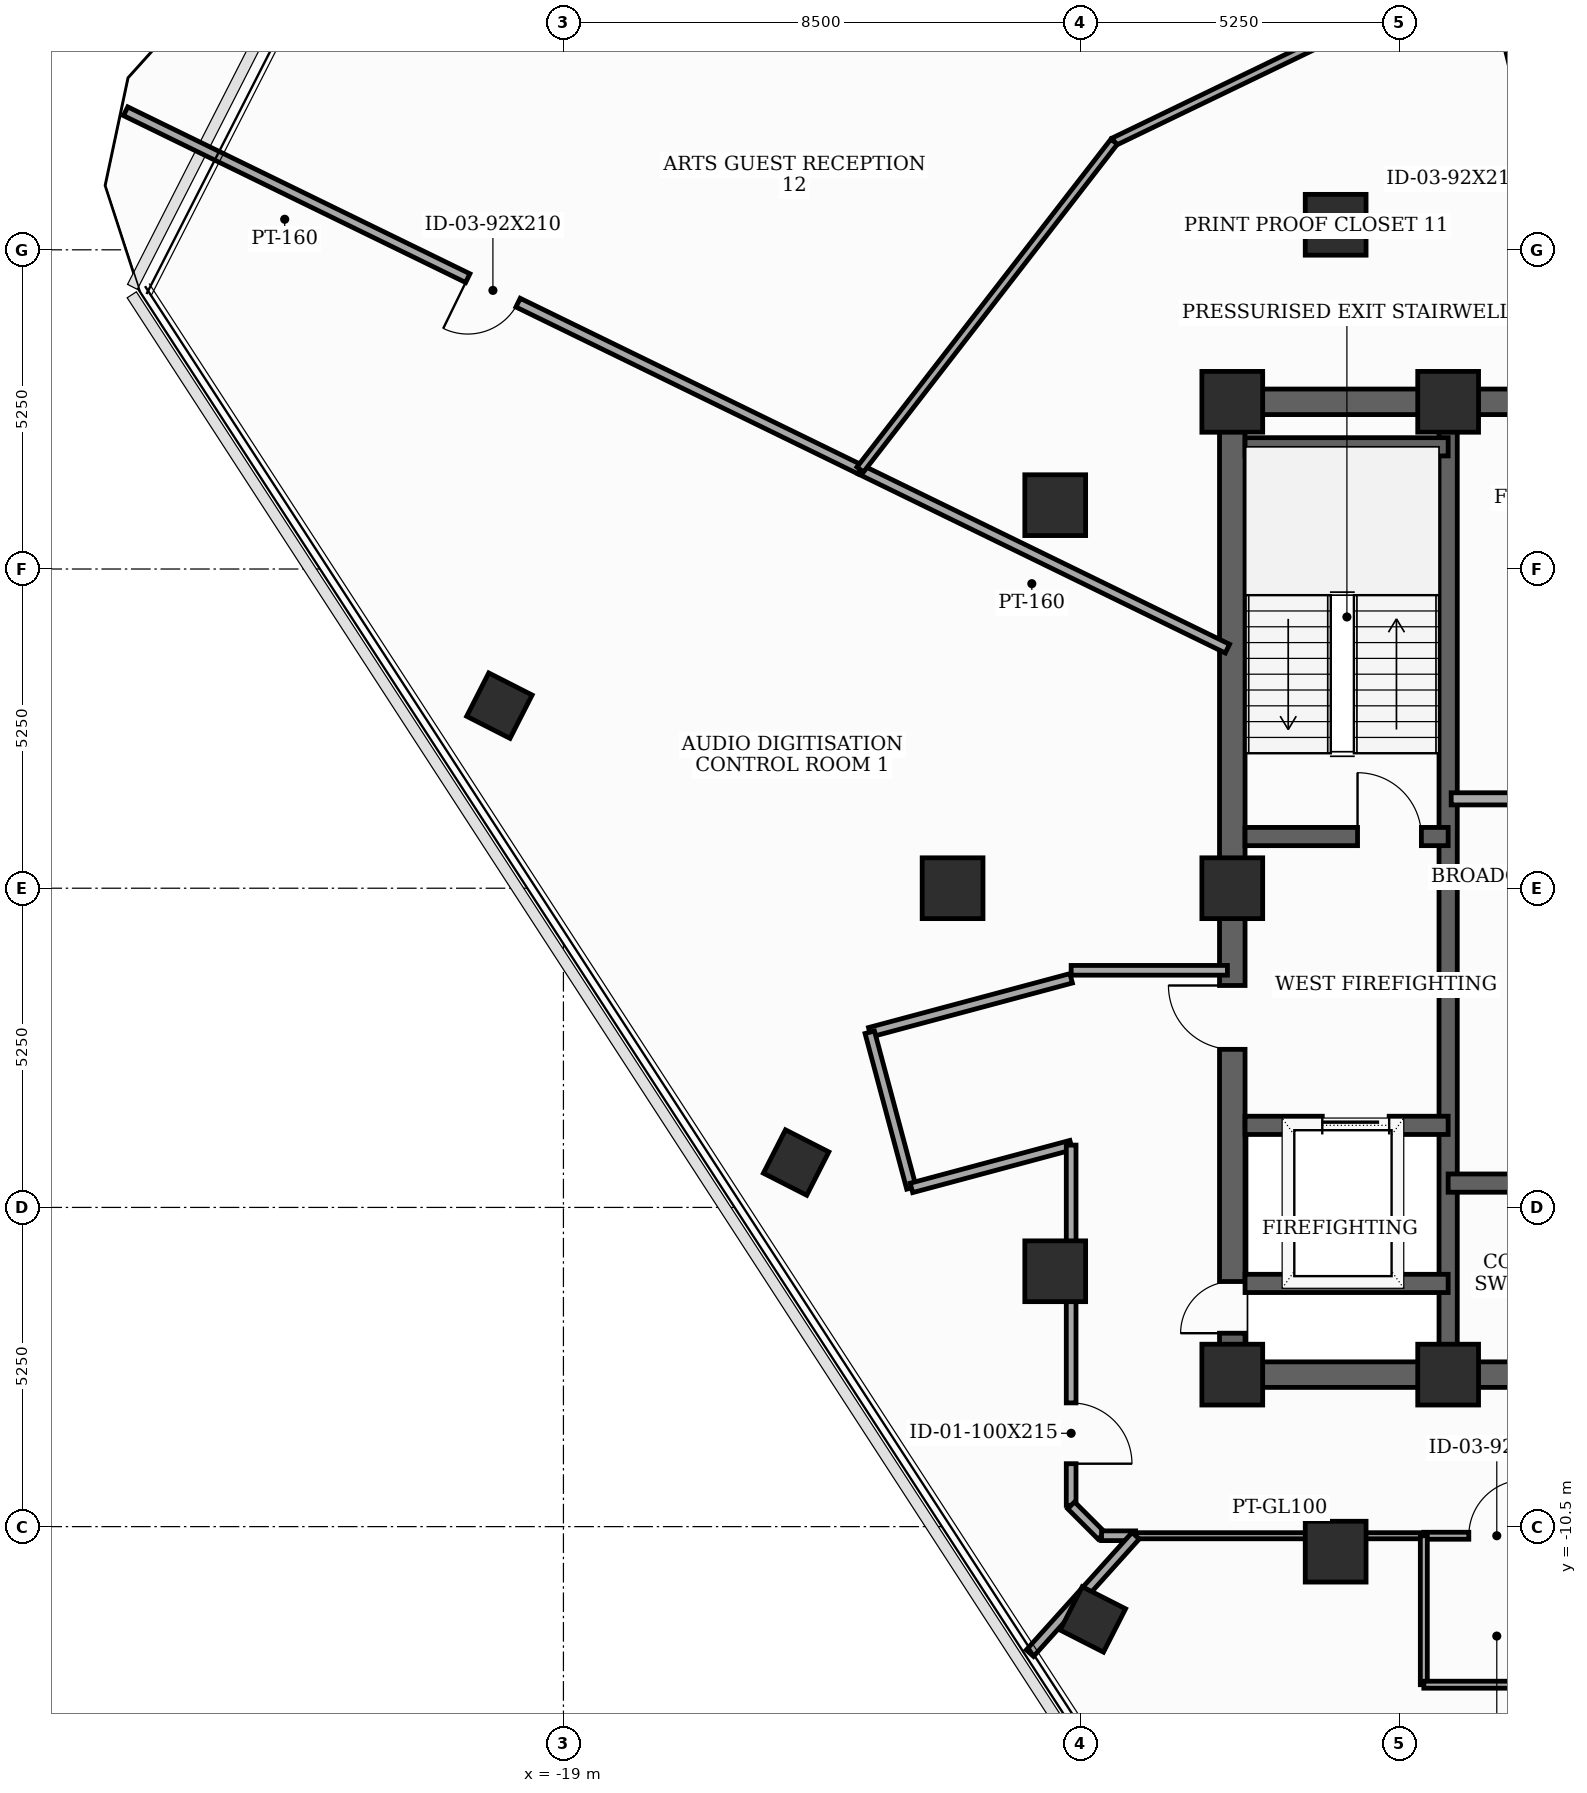
"""IFC4 building model, lengths in metres.
Left out: names, types, materials, properties, quantities, classifications, styles, units other than length and angle.
Written with IfcOpenShell. Run it as: python <this file> out.ifc"""

import sys

from ifc_helpers import new_model, si_unit, direction, frame, frame_2d, origin, origin_2d, place, context, subcontext, project, spatial, rectangle, extrude, element, fill, save


model = new_model("IFC4")
c1 = context("Model", 3, precision=1e-05, world=origin(), true_north=direction((0.0, 1.0)))
c2 = subcontext(c1, "Body", "Model", "MODEL_VIEW")
j1 = project(units=[si_unit("LENGTHUNIT", "METRE"), si_unit("PLANEANGLEUNIT", "RADIAN")], contexts=[c1])
p1 = place(None, origin())
s1 = spatial("IfcSite", under=j1, at=p1, CompositionType="ELEMENT")
p2 = place(p1, origin())
s2 = spatial("IfcBuilding", under=s1, at=p2, CompositionType="ELEMENT")
p3 = place(p2, frame((0.0, 0.0, 248.5)))
s3 = spatial("IfcBuildingStorey", under=s2, at=p3, CompositionType="ELEMENT", Elevation=248.5)
for number, where, z_axis, x_axis in (
    (1, (-8.0, -8.0, 0.0), (0.0, 0.0, 1.0), (1.0, 0.0, 0.0)),
    (2, (-4.45, -8.0, 0.0), (0.0, 0.0, 1.0), (1.0, 0.0, 0.0)),
    (3, (-4.45, 8.0, 0.0), (0.0, 0.0, 1.0), (1.0, 0.0, 0.0)),
    (4, (-8.0, 8.0, 0.0), (0.0, 0.0, 1.0), (1.0, 0.0, 0.0)),
    (5, (-8.0, 0.0, 0.0), (0.0, 0.0, 1.0), (1.0, 0.0, 0.0)),
    (6, (-6.3, 10.912, 0.0), (0.0, 0.0, 1.0), (1.0, 0.0, 0.0)),
    (7, (-10.912, 6.3, 0.0), (0.0, 0.0, 1.0), (1.0, 0.0, 0.0)),
    (8, (-12.6, 0.0, 0.0), (0.0, 0.0, 1.0), (1.0, 0.0, 0.0)),
    (9, (-10.912, -6.3, 0.0), (0.0, 0.0, 1.0), (1.0, 0.0, 0.0)),
    (10, (-6.3, -10.912, 0.0), (0.0, 0.0, 1.0), (1.0, 0.0, 0.0)),
):
    element("IfcColumn", number, at=place(p3, frame(where, z_axis=z_axis, x_axis=x_axis)), inside=s3, PredefinedType="COLUMN", context=c2, shape_type="SweptSolid", body=[
        extrude(rectangle(XDim=1.0, YDim=1.0, at=origin_2d()), origin(), (0.0, 0.0, 1.0), 3.7),
    ])
for number, where, z_axis, x_axis in (
    (11, (-20.053, 3.003, 0.0), (0.0, 0.0, 1.0), (0.454, 0.891, 0.0)),
    (12, (-15.173, -4.512, 0.0), (0.0, 0.0, 1.0), (0.454, 0.891, 0.0)),
    (13, (-10.293, -12.026, 0.0), (0.0, 0.0, 1.0), (0.454, 0.891, 0.0)),
):
    element("IfcColumn", number, at=place(p3, frame(where, z_axis=z_axis, x_axis=x_axis)), inside=s3, PredefinedType="COLUMN", context=c2, shape_type="SweptSolid", body=[
        extrude(rectangle(XDim=0.8, YDim=0.8, at=origin_2d()), origin(), (0.0, 0.0, 1.0), 3.7),
    ])
p4 = place(p3, frame((-8.0, -8.0, 0.0), z_axis=(0.0, 0.0, 1.0), x_axis=(0.0, 1.0, 0.0)))
e14 = element("IfcWall", 14, at=p4, inside=s3, PredefinedType="SHEAR", context=c2, shape_type="SweptSolid", body=[
    extrude(rectangle(XDim=16.0, YDim=0.42, at=frame_2d((8.0, 0.0))), origin(), (0.0, 0.0, 1.0), 3.5),
])
p5 = place(p4, frame((0.681, 0.0, 0.0)))
e15 = element("IfcOpeningElement", 15, at=p5, cuts=e14, PredefinedType="OPENING", context=c2, shape_type="SweptSolid", body=[
    extrude(rectangle(XDim=0.85, YDim=2.02, at=frame_2d((0.425, 1.01))), frame((0.0, 0.22, 0.0), z_axis=(0.0, -1.0, 0.0), x_axis=(1.0, 0.0, 0.0)), (0.0, 0.0, 1.0), 0.44),
])
p6 = place(p4, frame((5.35, 0.0, 0.0)))
e16 = element("IfcOpeningElement", 16, at=p6, cuts=e14, PredefinedType="OPENING", context=c2, shape_type="SweptSolid", body=[
    extrude(rectangle(XDim=1.05, YDim=2.15, at=frame_2d((0.525, 1.075))), frame((0.0, 0.22, 0.0), z_axis=(0.0, -1.0, 0.0), x_axis=(1.0, 0.0, 0.0)), (0.0, 0.0, 1.0), 0.44),
])
p7 = place(p3, frame((-8.0, -8.0, 0.0), z_axis=(0.0, 0.0, 1.0), x_axis=(1.0, 0.0, 0.0)))
e17 = element("IfcWall", 17, at=p7, inside=s3, PredefinedType="SHEAR", context=c2, shape_type="SweptSolid", body=[
    extrude(rectangle(XDim=16.0, YDim=0.42, at=frame_2d((8.0, 0.0))), origin(), (0.0, 0.0, 1.0), 3.5),
])
p8 = place(p7, frame((7.52, 0.0, 0.0)))
e18 = element("IfcOpeningElement", 18, at=p8, cuts=e17, PredefinedType="OPENING", context=c2, shape_type="SweptSolid", body=[
    extrude(rectangle(XDim=0.95, YDim=2.1, at=frame_2d((0.475, 1.05))), frame((0.0, 0.22, 0.0), z_axis=(0.0, -1.0, 0.0), x_axis=(1.0, 0.0, 0.0)), (0.0, 0.0, 1.0), 0.44),
])
p9 = place(p3, frame((-8.0, 8.0, 0.0), z_axis=(0.0, 0.0, 1.0), x_axis=(1.0, 0.0, 0.0)))
e19 = element("IfcWall", 19, at=p9, inside=s3, PredefinedType="SHEAR", context=c2, shape_type="SweptSolid", body=[
    extrude(rectangle(XDim=16.0, YDim=0.42, at=frame_2d((8.0, 0.0))), origin(), (0.0, 0.0, 1.0), 3.5),
])
p10 = place(p9, frame((7.1, 0.0, 0.0)))
e20 = element("IfcOpeningElement", 20, at=p10, cuts=e19, PredefinedType="OPENING", context=c2, shape_type="SweptSolid", body=[
    extrude(rectangle(XDim=1.8, YDim=2.15, at=frame_2d((0.9, 1.075))), frame((0.0, 0.22, 0.0), z_axis=(0.0, -1.0, 0.0), x_axis=(1.0, 0.0, 0.0)), (0.0, 0.0, 1.0), 0.44),
])
p11 = place(p3, frame((-4.45, -7.79, 0.0), z_axis=(0.0, 0.0, 1.0), x_axis=(0.0, 1.0, 0.0)))
e21 = element("IfcWall", 21, at=p11, inside=s3, PredefinedType="SHEAR", context=c2, shape_type="SweptSolid", body=[
    extrude(rectangle(XDim=15.58, YDim=0.3, at=frame_2d((7.79, 0.0))), origin(), (0.0, 0.0, 1.0), 3.5),
])
p12 = place(p3, frame((-7.79, 0.85, 0.0), z_axis=(0.0, 0.0, 1.0), x_axis=(1.0, 0.0, 0.0)))
e22 = element("IfcWall", 22, at=p12, inside=s3, PredefinedType="SHEAR", context=c2, shape_type="SweptSolid", body=[
    extrude(rectangle(XDim=3.34, YDim=0.3, at=frame_2d((1.67, 0.0))), origin(), (0.0, 0.0, 1.0), 3.5),
])
p13 = place(p12, frame((1.85, 0.0, 0.0)))
e23 = element("IfcOpeningElement", 23, at=p13, cuts=e22, PredefinedType="OPENING", context=c2, shape_type="SweptSolid", body=[
    extrude(rectangle(XDim=1.05, YDim=2.15, at=frame_2d((0.525, 1.075))), frame((0.0, 0.16, 0.0), z_axis=(0.0, -1.0, 0.0), x_axis=(1.0, 0.0, 0.0)), (0.0, 0.0, 1.0), 0.32),
])
p14 = place(p3, frame((-7.79, 7.26, 0.0), z_axis=(0.0, 0.0, 1.0), x_axis=(1.0, 0.0, 0.0)))
e24 = element("IfcWall", 24, at=p14, inside=s3, PredefinedType="SHEAR", context=c2, shape_type="SweptSolid", body=[
    extrude(rectangle(XDim=3.34, YDim=0.3, at=frame_2d((1.67, 0.0))), origin(), (0.0, 0.0, 1.0), 3.5),
])
p15 = place(p3, frame((-7.79, -3.9, 0.0), z_axis=(0.0, 0.0, 1.0), x_axis=(1.0, 0.0, 0.0)))
e25 = element("IfcWall", 25, at=p15, inside=s3, PredefinedType="SHEAR", context=c2, shape_type="SweptSolid", body=[
    extrude(rectangle(XDim=3.34, YDim=0.3, at=frame_2d((1.67, 0.0))), origin(), (0.0, 0.0, 1.0), 3.5),
])
p16 = place(p15, frame((1.27, 0.0, 0.0)))
e26 = element("IfcOpeningElement", 26, at=p16, cuts=e25, PredefinedType="OPENING", context=c2, shape_type="SweptSolid", body=[
    extrude(rectangle(XDim=1.1, YDim=2.1, at=frame_2d((0.55, 1.05))), frame((0.0, 0.16, 0.0), z_axis=(0.0, -1.0, 0.0), x_axis=(1.0, 0.0, 0.0)), (0.0, 0.0, 1.0), 0.32),
])
p17 = place(p3, frame((-7.79, -6.5, 0.0), z_axis=(0.0, 0.0, 1.0), x_axis=(1.0, 0.0, 0.0)))
e27 = element("IfcWall", 27, at=p17, inside=s3, PredefinedType="SHEAR", context=c2, shape_type="SweptSolid", body=[
    extrude(rectangle(XDim=3.34, YDim=0.3, at=frame_2d((1.67, 0.0))), origin(), (0.0, 0.0, 1.0), 3.5),
])
p18 = place(p3, frame((-4.45, -4.85, 0.0), z_axis=(0.0, 0.0, 1.0), x_axis=(1.0, 0.0, 0.0)))
e28 = element("IfcWall", 28, at=p18, inside=s3, PredefinedType="SHEAR", context=c2, shape_type="SweptSolid", body=[
    extrude(rectangle(XDim=8.9, YDim=0.3, at=frame_2d((4.45, 0.0))), origin(), (0.0, 0.0, 1.0), 3.5),
])
p19 = place(p3, frame((-4.4, 1.47, 0.0), z_axis=(0.0, 0.0, 1.0), x_axis=(1.0, 0.0, 0.0)))
e29 = element("IfcWall", 29, at=p19, inside=s3, PredefinedType="SOLIDWALL", context=c2, shape_type="SweptSolid", body=[
    extrude(rectangle(XDim=2.68, YDim=0.2, at=frame_2d((1.34, 0.0))), origin(), (0.0, 0.0, 1.0), 3.5),
])
p20 = place(p3, frame((-8.08, -1.35, 0.0), z_axis=(0.0, 0.0, 1.0), x_axis=(-1.0, 0.0, 0.0)))
e30 = element("IfcWall", 30, at=p20, inside=s3, PredefinedType="PARTITIONING", context=c2, shape_type="SweptSolid", body=[
    extrude(rectangle(XDim=2.57, YDim=0.16, at=frame_2d((1.285, 0.0))), origin(), (0.0, 0.0, 1.0), 2.885),
])
p21 = place(p3, frame((-10.65, -1.482, 0.0), z_axis=(0.0, 0.0, 1.0), x_axis=(-0.965961397105, -0.2586862565, 0.0)))
e31 = element("IfcWall", 31, at=p21, inside=s3, PredefinedType="PARTITIONING", context=c2, shape_type="SweptSolid", body=[
    extrude(rectangle(XDim=3.429, YDim=0.16, at=frame_2d((1.714, 0.0))), origin(), (0.0, 0.0, 1.0), 2.885),
])
p22 = place(p3, frame((-13.962, -2.369, 0.0), z_axis=(0.0, 0.0, 1.0), x_axis=(0.258413725385, -0.966034340245, 0.0)))
e32 = element("IfcWall", 32, at=p22, inside=s3, PredefinedType="PARTITIONING", context=c2, shape_type="SweptSolid", body=[
    extrude(rectangle(XDim=2.65, YDim=0.16, at=frame_2d((1.325, 0.0))), origin(), (0.0, 0.0, 1.0), 3.5),
])
p23 = place(p3, frame((-13.277, -4.929, 0.0), z_axis=(0.0, 0.0, 1.0), x_axis=(0.965934830229, 0.258785439601, 0.0)))
e33 = element("IfcWall", 33, at=p23, inside=s3, PredefinedType="PARTITIONING", context=c2, shape_type="SweptSolid", body=[
    extrude(rectangle(XDim=2.72, YDim=0.16, at=frame_2d((1.36, 0.0))), origin(), (0.0, 0.0, 1.0), 2.885),
])
p24 = place(p3, frame((-10.65, -4.225, 0.0), z_axis=(0.0, 0.0, 1.0), x_axis=(0.0, -1.0, 0.0)))
e34 = element("IfcWall", 34, at=p24, inside=s3, PredefinedType="PARTITIONING", context=c2, shape_type="SweptSolid", body=[
    extrude(rectangle(XDim=5.925, YDim=0.16, at=frame_2d((2.962, 0.0))), origin(), (0.0, 0.0, 1.0), 2.885),
])
p25 = place(p24, frame((4.24, 0.0, 0.0)))
e35 = element("IfcOpeningElement", 35, at=p25, cuts=e34, PredefinedType="OPENING", context=c2, shape_type="SweptSolid", body=[
    extrude(rectangle(XDim=1.0, YDim=2.15, at=frame_2d((0.5, 1.075))), frame((0.0, 0.09, 0.0), z_axis=(0.0, -1.0, 0.0), x_axis=(1.0, 0.0, 0.0)), (0.0, 0.0, 1.0), 0.18),
])
p26 = place(p3, frame((-10.65, -10.15, 0.0), z_axis=(0.0, 0.0, 1.0), x_axis=(0.707106781187, -0.707106781187, 0.0)))
e36 = element("IfcWall", 36, at=p26, inside=s3, PredefinedType="PARTITIONING", context=c2, shape_type="SweptSolid", body=[
    extrude(rectangle(XDim=0.707, YDim=0.16, at=frame_2d((0.354, 0.0))), origin(), (0.0, 0.0, 1.0), 3.5),
])
p27 = place(p3, frame((-10.15, -10.65, 0.0), z_axis=(0.0, 0.0, 1.0), x_axis=(1.0, 0.0, 0.0)))
e37 = element("IfcWall", 37, at=p27, inside=s3, PredefinedType="PARTITIONING", context=c2, shape_type="SweptSolid", body=[
    extrude(rectangle(XDim=0.561, YDim=0.16, at=frame_2d((0.28, 0.0))), origin(), (0.0, 0.0, 1.0), 3.5),
])
p28 = place(p3, frame((-4.85, -10.65, 0.0), z_axis=(0.0, 0.0, 1.0), x_axis=(1.0, 0.0, 0.0)))
e38 = element("IfcWall", 38, at=p28, inside=s3, PredefinedType="PARTITIONING", context=c2, shape_type="SweptSolid", body=[
    extrude(rectangle(XDim=2.4, YDim=0.115, at=frame_2d((1.2, 0.0))), origin(), (0.0, 0.0, 1.0), 3.5),
])
p29 = place(p28, frame((0.74, 0.0, 0.0)))
e39 = element("IfcOpeningElement", 39, at=p29, cuts=e38, PredefinedType="OPENING", context=c2, shape_type="SweptSolid", body=[
    extrude(rectangle(XDim=0.92, YDim=2.1, at=frame_2d((0.46, 1.05))), frame((0.0, 0.067, 0.0), z_axis=(0.0, -1.0, 0.0), x_axis=(1.0, 0.0, 0.0)), (0.0, 0.0, 1.0), 0.135),
])
p30 = place(p3, frame((-9.589, -10.65, 0.0), z_axis=(0.0, 0.0, 1.0), x_axis=(1.0, 0.0, 0.0)))
e40 = element("IfcWall", 40, at=p30, inside=s3, PredefinedType="MOVABLE", context=c2, shape_type="SweptSolid", body=[
    extrude(rectangle(XDim=4.739, YDim=0.1, at=frame_2d((2.37, 0.0))), origin(), (0.0, 0.0, 1.0), 2.885),
])
p31 = place(p3, frame((-11.328, -12.581, 0.0), z_axis=(0.0, 0.0, 1.0), x_axis=(0.669120437161, 0.743153981739, 0.0)))
e41 = element("IfcWall", 41, at=p31, inside=s3, PredefinedType="PARTITIONING", context=c2, shape_type="SweptSolid", body=[
    extrude(rectangle(XDim=2.599, YDim=0.16, at=frame_2d((1.299, 0.0))), origin(), (0.0, 0.0, 1.0), 3.035),
])
p32 = place(p3, frame((-8.08, 3.941, 0.0), z_axis=(0.0, 0.0, 1.0), x_axis=(-0.898794985177, 0.438369221798, 0.0)))
e42 = element("IfcWall", 42, at=p32, inside=s3, PredefinedType="PARTITIONING", context=c2, shape_type="SweptSolid", body=[
    extrude(rectangle(XDim=6.719, YDim=0.16, at=frame_2d((3.359, 0.0))), origin(), (0.0, 0.0, 1.0), 2.885),
])
p33 = place(p3, frame((-14.119, 6.886, 0.0), z_axis=(0.0, 0.0, 1.0), x_axis=(-0.898768620199, 0.438423274184, 0.0)))
e43 = element("IfcWall", 43, at=p33, inside=s3, PredefinedType="PARTITIONING", context=c2, shape_type="SweptSolid", body=[
    extrude(rectangle(XDim=13.442, YDim=0.16, at=frame_2d((6.721, 0.0))), origin(), (0.0, 0.0, 1.0), 3.035),
])
p34 = place(p33, frame((6.261, 0.0, 0.0)))
e44 = element("IfcOpeningElement", 44, at=p34, cuts=e43, PredefinedType="OPENING", context=c2, shape_type="SweptSolid", body=[
    extrude(rectangle(XDim=0.92, YDim=2.1, at=frame_2d((0.46, 1.05))), frame((0.0, 0.09, 0.0), z_axis=(0.0, -1.0, 0.0), x_axis=(1.0, 0.0, 0.0)), (0.0, 0.0, 1.0), 0.18),
])
p35 = place(p3, frame((-4.85, -10.65, 0.0), z_axis=(0.0, 0.0, 1.0), x_axis=(0.0, -1.0, 0.0)))
e45 = element("IfcWall", 45, at=p35, inside=s3, PredefinedType="PARTITIONING", context=c2, shape_type="SweptSolid", body=[
    extrude(rectangle(XDim=2.45, YDim=0.115, at=frame_2d((1.225, 0.0))), origin(), (0.0, 0.0, 1.0), 2.885),
])
p36 = place(p3, frame((-4.85, -13.1, 0.0), z_axis=(0.0, 0.0, 1.0), x_axis=(1.0, 0.0, 0.0)))
e46 = element("IfcWall", 46, at=p36, inside=s3, PredefinedType="PARTITIONING", context=c2, shape_type="SweptSolid", body=[
    extrude(rectangle(XDim=2.4, YDim=0.115, at=frame_2d((1.2, 0.0))), origin(), (0.0, 0.0, 1.0), 3.5),
])
p37 = place(p3, frame((-3.8, 15.242, 0.0), z_axis=(0.0, 0.0, 1.0), x_axis=(0.241889603588, -0.970303777008, 0.0)))
e47 = element("IfcWall", 47, at=p37, inside=s3, PredefinedType="PARTITIONING", context=c2, shape_type="SweptSolid", body=[
    extrude(rectangle(XDim=7.381, YDim=0.135, at=frame_2d((3.69, 0.0))), origin(), (0.0, 0.0, 1.0), 2.885),
])
p38 = place(p37, frame((3.231, 0.0, 0.0)))
e48 = element("IfcOpeningElement", 48, at=p38, cuts=e47, PredefinedType="OPENING", context=c2, shape_type="SweptSolid", body=[
    extrude(rectangle(XDim=0.92, YDim=2.1, at=frame_2d((0.46, 1.05))), frame((0.0, 0.077, 0.0), z_axis=(0.0, -1.0, 0.0), x_axis=(1.0, 0.0, 0.0)), (0.0, 0.0, 1.0), 0.155),
])
p39 = place(p3, frame((-3.8, 15.242, 0.0), z_axis=(0.0, 0.0, 1.0), x_axis=(-0.900708156853, -0.434424695635, 0.0)))
e49 = element("IfcWall", 49, at=p39, inside=s3, PredefinedType="PARTITIONING", context=c2, shape_type="SweptSolid", body=[
    extrude(rectangle(XDim=6.82, YDim=0.135, at=frame_2d((3.41, 0.0))), origin(), (0.0, 0.0, 1.0), 3.035),
])
p40 = place(p3, frame((-9.943, 12.279, 0.0), z_axis=(0.0, 0.0, 1.0), x_axis=(-0.612219395693, -0.790687935621, 0.0)))
e50 = element("IfcWall", 50, at=p40, inside=s3, PredefinedType="PARTITIONING", context=c2, shape_type="SweptSolid", body=[
    extrude(rectangle(XDim=6.821, YDim=0.135, at=frame_2d((3.41, 0.0))), origin(), (0.0, 0.0, 1.0), 3.185),
])
p41 = place(p5, origin())
e51 = element("IfcDoor", 51, at=p41, inside=s3, OperationType="SINGLE_SWING_LEFT", PredefinedType="TRAPDOOR", context=c2, shape_type="SweptSolid", body=[
    extrude(rectangle(XDim=0.85, YDim=2.02, at=frame_2d((0.425, 1.01))), frame((0.0, 0.025, 0.0), z_axis=(0.0, -1.0, 0.0), x_axis=(1.0, 0.0, 0.0)), (0.0, 0.0, 1.0), 0.05),
])
fill(e15, e51)
p42 = place(p6, origin())
e52 = element("IfcDoor", 52, at=p42, inside=s3, OperationType="SINGLE_SWING_RIGHT", PredefinedType="DOOR", context=c2, shape_type="SweptSolid", body=[
    extrude(rectangle(XDim=1.05, YDim=2.15, at=frame_2d((0.525, 1.075))), frame((0.0, 0.025, 0.0), z_axis=(0.0, -1.0, 0.0), x_axis=(1.0, 0.0, 0.0)), (0.0, 0.0, 1.0), 0.05),
])
fill(e16, e52)
p43 = place(p13, origin())
e53 = element("IfcDoor", 53, at=p43, inside=s3, OperationType="SINGLE_SWING_LEFT", PredefinedType="DOOR", context=c2, shape_type="SweptSolid", body=[
    extrude(rectangle(XDim=1.05, YDim=2.15, at=frame_2d((0.525, 1.075))), frame((0.0, 0.025, 0.0), z_axis=(0.0, -1.0, 0.0), x_axis=(1.0, 0.0, 0.0)), (0.0, 0.0, 1.0), 0.05),
])
fill(e23, e53)
p44 = place(p16, origin())
e54 = element("IfcDoor", 54, at=p44, inside=s3, OperationType="SLIDING_TO_LEFT", PredefinedType="DOOR", context=c2, shape_type="SweptSolid", body=[
    extrude(rectangle(XDim=1.1, YDim=2.1, at=frame_2d((0.55, 1.05))), frame((0.0, 0.025, 0.0), z_axis=(0.0, -1.0, 0.0), x_axis=(1.0, 0.0, 0.0)), (0.0, 0.0, 1.0), 0.05),
])
fill(e26, e54)
p45 = place(p25, origin())
e55 = element("IfcDoor", 55, at=p45, inside=s3, OperationType="SINGLE_SWING_RIGHT", PredefinedType="DOOR", context=c2, shape_type="SweptSolid", body=[
    extrude(rectangle(XDim=1.0, YDim=2.15, at=frame_2d((0.5, 1.075))), frame((0.0, 0.025, 0.0), z_axis=(0.0, -1.0, 0.0), x_axis=(1.0, 0.0, 0.0)), (0.0, 0.0, 1.0), 0.05),
])
fill(e35, e55)
p46 = place(p29, origin())
e56 = element("IfcDoor", 56, at=p46, inside=s3, OperationType="SINGLE_SWING_RIGHT", PredefinedType="DOOR", context=c2, shape_type="SweptSolid", body=[
    extrude(rectangle(XDim=0.92, YDim=2.1, at=frame_2d((0.46, 1.05))), frame((0.0, 0.025, 0.0), z_axis=(0.0, -1.0, 0.0), x_axis=(1.0, 0.0, 0.0)), (0.0, 0.0, 1.0), 0.05),
])
fill(e39, e56)
p47 = place(p34, origin())
e57 = element("IfcDoor", 57, at=p47, inside=s3, OperationType="SINGLE_SWING_RIGHT", PredefinedType="DOOR", context=c2, shape_type="SweptSolid", body=[
    extrude(rectangle(XDim=0.92, YDim=2.1, at=frame_2d((0.46, 1.05))), frame((0.0, 0.025, 0.0), z_axis=(0.0, -1.0, 0.0), x_axis=(1.0, 0.0, 0.0)), (0.0, 0.0, 1.0), 0.05),
])
fill(e44, e57)
save(model, sys.argv[1])
